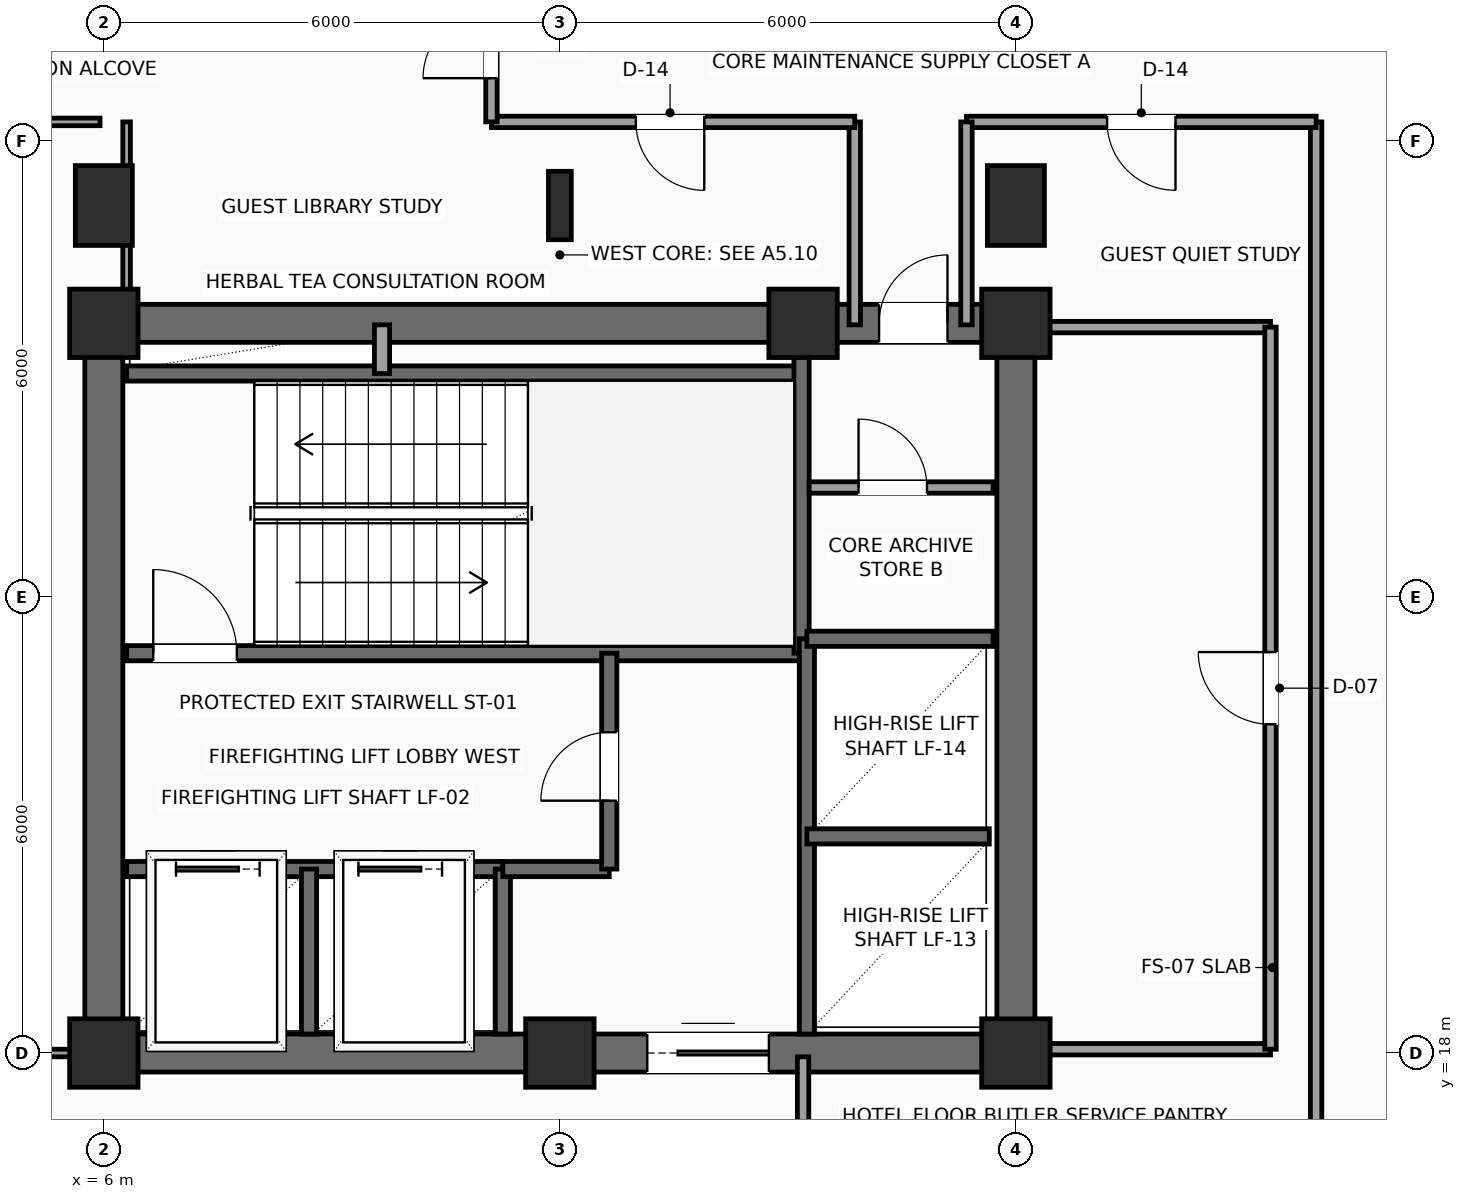
"""IFC4 building model, lengths in metres.
Left out: names, types, materials, properties, quantities, classifications, styles, units other than length and angle.
Written with IfcOpenShell. Run it as: python <this file> out.ifc"""

import sys

from ifc_helpers import new_model, si_unit, direction, frame, frame_2d, origin, origin_2d, place, context, subcontext, project, spatial, rectangle, i_section, extrude, element, fill, save


model = new_model("IFC4")
c1 = context("Model", 3, precision=1e-05, world=origin(), true_north=direction((0.0, 1.0)))
c2 = subcontext(c1, "Body", "Model", "MODEL_VIEW")
j1 = project(units=[si_unit("LENGTHUNIT", "METRE"), si_unit("PLANEANGLEUNIT", "RADIAN")], contexts=[c1])
p1 = place(None, origin())
s1 = spatial("IfcSite", under=j1, at=p1, CompositionType="ELEMENT")
p2 = place(p1, origin())
s2 = spatial("IfcBuilding", under=s1, at=p2, CompositionType="ELEMENT")
p3 = place(p2, frame((0.0, 0.0, 191.7)))
s3 = spatial("IfcBuildingStorey", under=s2, at=p3, CompositionType="ELEMENT", Elevation=191.7)
for number, where, z_axis, x_axis in (
    (1, (6.0, 18.0, 0.0), (0.0, 0.0, 1.0), (1.0, 0.0, 0.0)),
    (2, (12.0, 18.0, 0.0), (0.0, 0.0, 1.0), (1.0, 0.0, 0.0)),
    (3, (18.0, 18.0, 0.0), (0.0, 0.0, 1.0), (1.0, 0.0, 0.0)),
    (4, (6.0, 27.6, 0.0), (0.0, 0.0, 1.0), (1.0, 0.0, 0.0)),
    (5, (15.2, 27.6, 0.0), (0.0, 0.0, 1.0), (1.0, 0.0, 0.0)),
    (6, (18.0, 27.6, 0.0), (0.0, 0.0, 1.0), (1.0, 0.0, 0.0)),
):
    element("IfcColumn", number, at=place(p3, frame(where, z_axis=z_axis, x_axis=x_axis)), inside=s3, PredefinedType="COLUMN", context=c2, shape_type="SweptSolid", body=[
        extrude(rectangle(XDim=0.9, YDim=0.9, at=origin_2d()), origin(), (0.0, 0.0, 1.0), 3.75),
    ])
p4 = place(p3, frame((6.0, 29.15, 0.0), z_axis=(0.0, 0.0, 1.0), x_axis=(1.0, 0.0, 0.0)))
e7 = element("IfcColumn", 7, at=p4, inside=s3, PredefinedType="COLUMN", context=c2, shape_type="SweptSolid", body=[
    extrude(rectangle(XDim=0.75, YDim=1.05, at=origin_2d()), origin(), (0.0, 0.0, 1.0), 3.75),
])
p5 = place(p3, frame((12.0, 29.15, 0.0), z_axis=(0.0, 0.0, 1.0), x_axis=(1.0, 0.0, 0.0)))
e8 = element("IfcColumn", 8, at=p5, inside=s3, PredefinedType="COLUMN", context=c2, shape_type="SweptSolid", body=[
    extrude(i_section(OverallWidth=0.3, OverallDepth=0.9, WebThickness=0.019, FlangeThickness=0.035, FilletRadius=0.03, at=origin_2d()), origin(), (0.0, 0.0, 1.0), 3.75),
])
p6 = place(p3, frame((18.0, 29.15, 0.0), z_axis=(0.0, 0.0, 1.0), x_axis=(1.0, 0.0, 0.0)))
e9 = element("IfcColumn", 9, at=p6, inside=s3, PredefinedType="COLUMN", context=c2, shape_type="SweptSolid", body=[
    extrude(rectangle(XDim=0.75, YDim=1.05, at=origin_2d()), origin(), (0.0, 0.0, 1.0), 3.75),
])
p7 = place(p3, frame((6.0, 18.0, 0.0), z_axis=(0.0, 0.0, 1.0), x_axis=(1.0, 0.0, 0.0)))
e10 = element("IfcWall", 10, at=p7, inside=s3, PredefinedType="SHEAR", context=c2, shape_type="SweptSolid", body=[
    extrude(rectangle(XDim=12.0, YDim=0.5, at=frame_2d((6.0, 0.0))), origin(), (0.0, 0.0, 1.0), 3.54),
])
p8 = place(p7, frame((7.15, 0.0, 0.0)))
e11 = element("IfcOpeningElement", 11, at=p8, cuts=e10, PredefinedType="OPENING", context=c2, shape_type="SweptSolid", body=[
    extrude(rectangle(XDim=1.6, YDim=2.3, at=frame_2d((0.8, 1.15))), frame((0.0, 0.26, 0.0), z_axis=(0.0, -1.0, 0.0), x_axis=(1.0, 0.0, 0.0)), (0.0, 0.0, 1.0), 0.52),
])
p9 = place(p3, frame((6.0, 27.6, 0.0), z_axis=(0.0, 0.0, 1.0), x_axis=(1.0, 0.0, 0.0)))
e12 = element("IfcWall", 12, at=p9, inside=s3, PredefinedType="SHEAR", context=c2, shape_type="SweptSolid", body=[
    extrude(rectangle(XDim=12.0, YDim=0.5, at=frame_2d((6.0, 0.0))), origin(), (0.0, 0.0, 1.0), 3.54),
])
p10 = place(p9, frame((10.2, 0.0, 0.0)))
e13 = element("IfcOpeningElement", 13, at=p10, cuts=e12, PredefinedType="OPENING", context=c2, shape_type="SweptSolid", body=[
    extrude(rectangle(XDim=0.9, YDim=2.15, at=frame_2d((0.45, 1.075))), frame((0.0, 0.26, 0.0), z_axis=(0.0, -1.0, 0.0), x_axis=(1.0, 0.0, 0.0)), (0.0, 0.0, 1.0), 0.52),
])
for number, where, z_axis, x_axis in (
    (14, (6.0, 18.0, 0.0), (0.0, 0.0, 1.0), (0.0, 1.0, 0.0)),
    (15, (18.0, 18.0, 0.0), (0.0, 0.0, 1.0), (0.0, 1.0, 0.0)),
):
    element("IfcWall", number, at=place(p3, frame(where, z_axis=z_axis, x_axis=x_axis)), inside=s3, PredefinedType="SHEAR", context=c2, shape_type="SweptSolid", body=[
        extrude(rectangle(XDim=9.6, YDim=0.5, at=frame_2d((4.8, 0.0))), origin(), (0.0, 0.0, 1.0), 3.54),
    ])
p11 = place(p3, frame((6.3, 23.26, 0.0), z_axis=(0.0, 0.0, 1.0), x_axis=(1.0, 0.0, 0.0)))
e16 = element("IfcWall", 16, at=p11, inside=s3, PredefinedType="SHEAR", context=c2, shape_type="SweptSolid", body=[
    extrude(rectangle(XDim=8.88, YDim=0.2, at=frame_2d((4.44, 0.0))), origin(), (0.0, 0.0, 1.0), 3.54),
])
p12 = place(p11, frame((0.35, 0.0, 0.0)))
e17 = element("IfcOpeningElement", 17, at=p12, cuts=e16, PredefinedType="OPENING", context=c2, shape_type="SweptSolid", body=[
    extrude(rectangle(XDim=1.1, YDim=2.2, at=frame_2d((0.55, 1.1))), frame((0.0, 0.11, 0.0), z_axis=(0.0, -1.0, 0.0), x_axis=(1.0, 0.0, 0.0)), (0.0, 0.0, 1.0), 0.22),
])
p13 = place(p3, frame((6.3, 26.94, 0.0), z_axis=(0.0, 0.0, 1.0), x_axis=(1.0, 0.0, 0.0)))
e18 = element("IfcWall", 18, at=p13, inside=s3, PredefinedType="SHEAR", context=c2, shape_type="SweptSolid", body=[
    extrude(rectangle(XDim=8.88, YDim=0.2, at=frame_2d((4.44, 0.0))), origin(), (0.0, 0.0, 1.0), 3.54),
])
p14 = place(p3, frame((15.18, 23.26, 0.0), z_axis=(0.0, 0.0, 1.0), x_axis=(0.0, 1.0, 0.0)))
e19 = element("IfcWall", 19, at=p14, inside=s3, PredefinedType="SHEAR", context=c2, shape_type="SweptSolid", body=[
    extrude(rectangle(XDim=4.04, YDim=0.2, at=frame_2d((2.02, 0.0))), origin(), (0.0, 0.0, 1.0), 3.54),
])
p15 = place(p3, frame((6.3, 20.42, 0.0), z_axis=(0.0, 0.0, 1.0), x_axis=(1.0, 0.0, 0.0)))
e20 = element("IfcWall", 20, at=p15, inside=s3, PredefinedType="SHEAR", context=c2, shape_type="SweptSolid", body=[
    extrude(rectangle(XDim=4.95, YDim=0.2, at=frame_2d((2.475, 0.0))), origin(), (0.0, 0.0, 1.0), 3.54),
])
p16 = place(p15, frame((0.65, 0.0, 0.0)))
e21 = element("IfcOpeningElement", 21, at=p16, cuts=e20, PredefinedType="OPENING", context=c2, shape_type="SweptSolid", body=[
    extrude(rectangle(XDim=1.1, YDim=2.2, at=frame_2d((0.55, 1.1))), frame((0.0, 0.11, 0.0), z_axis=(0.0, -1.0, 0.0), x_axis=(1.0, 0.0, 0.0)), (0.0, 0.0, 1.0), 0.22),
])
p17 = place(p15, frame((3.05, 0.0, 0.0)))
e22 = element("IfcOpeningElement", 22, at=p17, cuts=e20, PredefinedType="OPENING", context=c2, shape_type="SweptSolid", body=[
    extrude(rectangle(XDim=1.1, YDim=2.2, at=frame_2d((0.55, 1.1))), frame((0.0, 0.11, 0.0), z_axis=(0.0, -1.0, 0.0), x_axis=(1.0, 0.0, 0.0)), (0.0, 0.0, 1.0), 0.22),
])
for number, where, z_axis, x_axis in (
    (23, (8.7, 18.25, 0.0), (0.0, 0.0, 1.0), (0.0, 1.0, 0.0)),
    (24, (11.25, 18.25, 0.0), (0.0, 0.0, 1.0), (0.0, 1.0, 0.0)),
):
    element("IfcWall", number, at=place(p3, frame(where, z_axis=z_axis, x_axis=x_axis)), inside=s3, PredefinedType="SHEAR", context=c2, shape_type="SweptSolid", body=[
        extrude(rectangle(XDim=2.17, YDim=0.2, at=frame_2d((1.085, 0.0))), origin(), (0.0, 0.0, 1.0), 3.54),
    ])
p18 = place(p3, frame((11.25, 20.42, 0.0), z_axis=(0.0, 0.0, 1.0), x_axis=(1.0, 0.0, 0.0)))
e25 = element("IfcWall", 25, at=p18, inside=s3, PredefinedType="SHEAR", context=c2, shape_type="SweptSolid", body=[
    extrude(rectangle(XDim=1.4, YDim=0.2, at=frame_2d((0.7, 0.0))), origin(), (0.0, 0.0, 1.0), 3.54),
])
p19 = place(p3, frame((12.65, 20.42, 0.0), z_axis=(0.0, 0.0, 1.0), x_axis=(0.0, 1.0, 0.0)))
e26 = element("IfcWall", 26, at=p19, inside=s3, PredefinedType="SHEAR", context=c2, shape_type="SweptSolid", body=[
    extrude(rectangle(XDim=2.84, YDim=0.2, at=frame_2d((1.42, 0.0))), origin(), (0.0, 0.0, 1.0), 3.54),
])
p20 = place(p19, frame((0.9, 0.0, 0.0)))
e27 = element("IfcOpeningElement", 27, at=p20, cuts=e26, PredefinedType="OPENING", context=c2, shape_type="SweptSolid", body=[
    extrude(rectangle(XDim=0.9, YDim=2.15, at=frame_2d((0.45, 1.075))), frame((0.0, 0.11, 0.0), z_axis=(0.0, -1.0, 0.0), x_axis=(1.0, 0.0, 0.0)), (0.0, 0.0, 1.0), 0.22),
])
p21 = place(p3, frame((9.66, 26.94, 0.0), z_axis=(0.0, 0.0, 1.0), x_axis=(0.0, 1.0, 0.0)))
e28 = element("IfcWall", 28, at=p21, inside=s3, PredefinedType="SOLIDWALL", context=c2, shape_type="SweptSolid", body=[
    extrude(rectangle(XDim=0.64, YDim=0.2, at=frame_2d((0.32, 0.0))), origin(), (0.0, 0.0, 1.0), 3.54),
])
p22 = place(p3, frame((15.25, 18.25, 0.0), z_axis=(0.0, 0.0, 1.0), x_axis=(0.0, 1.0, 0.0)))
e29 = element("IfcWall", 29, at=p22, inside=s3, PredefinedType="SHEAR", context=c2, shape_type="SweptSolid", body=[
    extrude(rectangle(XDim=5.2, YDim=0.2, at=frame_2d((2.6, 0.0))), origin(), (0.0, 0.0, 1.0), 3.54),
])
p23 = place(p3, frame((15.25, 20.85, 0.0), z_axis=(0.0, 0.0, 1.0), x_axis=(1.0, 0.0, 0.0)))
e30 = element("IfcWall", 30, at=p23, inside=s3, PredefinedType="SHEAR", context=c2, shape_type="SweptSolid", body=[
    extrude(rectangle(XDim=2.4, YDim=0.2, at=frame_2d((1.2, 0.0))), origin(), (0.0, 0.0, 1.0), 3.54),
])
p24 = place(p3, frame((15.25, 23.45, 0.0), z_axis=(0.0, 0.0, 1.0), x_axis=(1.0, 0.0, 0.0)))
e31 = element("IfcWall", 31, at=p24, inside=s3, PredefinedType="SHEAR", context=c2, shape_type="SweptSolid", body=[
    extrude(rectangle(XDim=2.45, YDim=0.2, at=frame_2d((1.225, 0.0))), origin(), (0.0, 0.0, 1.0), 3.54),
])
p25 = place(p3, frame((15.28, 25.44, 0.0), z_axis=(0.0, 0.0, 1.0), x_axis=(1.0, 0.0, 0.0)))
e32 = element("IfcWall", 32, at=p25, inside=s3, PredefinedType="PARTITIONING", context=c2, shape_type="SweptSolid", body=[
    extrude(rectangle(XDim=2.42, YDim=0.15, at=frame_2d((1.21, 0.0))), origin(), (0.0, 0.0, 1.0), 3.54),
])
p26 = place(p25, frame((0.65, 0.0, 0.0)))
e33 = element("IfcOpeningElement", 33, at=p26, cuts=e32, PredefinedType="OPENING", context=c2, shape_type="SweptSolid", body=[
    extrude(rectangle(XDim=0.9, YDim=2.15, at=frame_2d((0.45, 1.075))), frame((0.0, 0.085, 0.0), z_axis=(0.0, -1.0, 0.0), x_axis=(1.0, 0.0, 0.0)), (0.0, 0.0, 1.0), 0.17),
])
p27 = place(p3, frame((15.2, 17.95, 0.0), z_axis=(0.0, 0.0, 1.0), x_axis=(0.0, -1.0, 0.0)))
e34 = element("IfcWall", 34, at=p27, inside=s3, PredefinedType="PARTITIONING", context=c2, shape_type="SweptSolid", body=[
    extrude(rectangle(XDim=1.7, YDim=0.15, at=frame_2d((0.85, 0.0))), origin(), (0.0, 0.0, 1.0), 3.54),
])
p28 = place(p3, frame((21.95, 11.25, 0.0), z_axis=(0.0, 0.0, 1.0), x_axis=(0.0, 1.0, 0.0)))
e35 = element("IfcWall", 35, at=p28, inside=s3, PredefinedType="PARTITIONING", context=c2, shape_type="SweptSolid", body=[
    extrude(rectangle(XDim=19.0, YDim=0.15, at=frame_2d((9.5, 0.0))), origin(), (0.0, 0.0, 1.0), 3.54),
])
p29 = place(p3, frame((21.95, 30.25, 0.0), z_axis=(0.0, 0.0, 1.0), x_axis=(-1.0, 0.0, 0.0)))
e36 = element("IfcWall", 36, at=p29, inside=s3, PredefinedType="PARTITIONING", context=c2, shape_type="SweptSolid", body=[
    extrude(rectangle(XDim=4.6, YDim=0.15, at=frame_2d((2.3, 0.0))), origin(), (0.0, 0.0, 1.0), 3.54),
])
p30 = place(p29, frame((1.85, 0.0, 0.0)))
e37 = element("IfcOpeningElement", 37, at=p30, cuts=e36, PredefinedType="OPENING", context=c2, shape_type="SweptSolid", body=[
    extrude(rectangle(XDim=0.9, YDim=2.1, at=frame_2d((0.45, 1.05))), frame((0.0, 0.085, 0.0), z_axis=(0.0, -1.0, 0.0), x_axis=(1.0, 0.0, 0.0)), (0.0, 0.0, 1.0), 0.17),
])
for number, where, z_axis, x_axis in (
    (38, (17.35, 30.25, 0.0), (0.0, 0.0, 1.0), (0.0, -1.0, 0.0)),
    (39, (15.88, 27.58, 0.0), (0.0, 0.0, 1.0), (0.0, 1.0, 0.0)),
):
    element("IfcWall", number, at=place(p3, frame(where, z_axis=z_axis, x_axis=x_axis)), inside=s3, PredefinedType="PARTITIONING", context=c2, shape_type="SweptSolid", body=[
        extrude(rectangle(XDim=2.67, YDim=0.15, at=frame_2d((1.335, 0.0))), origin(), (0.0, 0.0, 1.0), 3.54),
    ])
p31 = place(p3, frame((15.88, 30.25, 0.0), z_axis=(0.0, 0.0, 1.0), x_axis=(-1.0, 0.0, 0.0)))
e40 = element("IfcWall", 40, at=p31, inside=s3, PredefinedType="PARTITIONING", context=c2, shape_type="SweptSolid", body=[
    extrude(rectangle(XDim=4.78, YDim=0.15, at=frame_2d((2.39, 0.0))), origin(), (0.0, 0.0, 1.0), 3.54),
])
p32 = place(p31, frame((1.98, 0.0, 0.0)))
e41 = element("IfcOpeningElement", 41, at=p32, cuts=e40, PredefinedType="OPENING", context=c2, shape_type="SweptSolid", body=[
    extrude(rectangle(XDim=0.9, YDim=2.1, at=frame_2d((0.45, 1.05))), frame((0.0, 0.085, 0.0), z_axis=(0.0, -1.0, 0.0), x_axis=(1.0, 0.0, 0.0)), (0.0, 0.0, 1.0), 0.17),
])
p33 = place(p3, frame((11.1, 30.25, 0.0), z_axis=(0.0, 0.0, 1.0), x_axis=(0.0, 1.0, 0.0)))
e42 = element("IfcWall", 42, at=p33, inside=s3, PredefinedType="PARTITIONING", context=c2, shape_type="SweptSolid", body=[
    extrude(rectangle(XDim=2.05, YDim=0.15, at=frame_2d((1.025, 0.0))), origin(), (0.0, 0.0, 1.0), 3.54),
])
p34 = place(p33, frame((0.575, 0.0, 0.0)))
e43 = element("IfcOpeningElement", 43, at=p34, cuts=e42, PredefinedType="OPENING", context=c2, shape_type="SweptSolid", body=[
    extrude(rectangle(XDim=0.9, YDim=2.1, at=frame_2d((0.45, 1.05))), frame((0.0, 0.085, 0.0), z_axis=(0.0, -1.0, 0.0), x_axis=(1.0, 0.0, 0.0)), (0.0, 0.0, 1.0), 0.17),
])
p35 = place(p3, frame((18.1, 18.05, 0.0), z_axis=(0.0, 0.0, 1.0), x_axis=(1.0, 0.0, 0.0)))
e44 = element("IfcWall", 44, at=p35, inside=s3, PredefinedType="PARTITIONING", context=c2, shape_type="SweptSolid", body=[
    extrude(rectangle(XDim=3.25, YDim=0.15, at=frame_2d((1.625, 0.0))), origin(), (0.0, 0.0, 1.0), 3.132),
])
p36 = place(p3, frame((18.1, 27.55, 0.0), z_axis=(0.0, 0.0, 1.0), x_axis=(1.0, 0.0, 0.0)))
e45 = element("IfcWall", 45, at=p36, inside=s3, PredefinedType="PARTITIONING", context=c2, shape_type="SweptSolid", body=[
    extrude(rectangle(XDim=3.25, YDim=0.15, at=frame_2d((1.625, 0.0))), origin(), (0.0, 0.0, 1.0), 3.54),
])
p37 = place(p3, frame((21.35, 18.05, 0.0), z_axis=(0.0, 0.0, 1.0), x_axis=(0.0, 1.0, 0.0)))
e46 = element("IfcWall", 46, at=p37, inside=s3, PredefinedType="PARTITIONING", context=c2, shape_type="SweptSolid", body=[
    extrude(rectangle(XDim=9.5, YDim=0.15, at=frame_2d((4.75, 0.0))), origin(), (0.0, 0.0, 1.0), 3.54),
])
p38 = place(p37, frame((4.275, 0.0, 0.0)))
e47 = element("IfcOpeningElement", 47, at=p38, cuts=e46, PredefinedType="OPENING", context=c2, shape_type="SweptSolid", body=[
    extrude(rectangle(XDim=0.95, YDim=2.15, at=frame_2d((0.475, 1.075))), frame((0.0, 0.085, 0.0), z_axis=(0.0, -1.0, 0.0), x_axis=(1.0, 0.0, 0.0)), (0.0, 0.0, 1.0), 0.17),
])
p39 = place(p3, frame((3.65, 18.0, 0.0), z_axis=(0.0, 0.0, 1.0), x_axis=(1.0, 0.0, 0.0)))
e48 = element("IfcWall", 48, at=p39, inside=s3, PredefinedType="PARTITIONING", context=c2, shape_type="SweptSolid", body=[
    extrude(rectangle(XDim=2.3, YDim=0.1, at=frame_2d((1.15, 0.0))), origin(), (0.0, 0.0, 1.0), 3.132),
])
p40 = place(p39, frame((0.7, 0.0, 0.0)))
e49 = element("IfcOpeningElement", 49, at=p40, cuts=e48, PredefinedType="OPENING", context=c2, shape_type="SweptSolid", body=[
    extrude(rectangle(XDim=0.9, YDim=2.1, at=frame_2d((0.45, 1.05))), frame((0.0, 0.06, 0.0), z_axis=(0.0, -1.0, 0.0), x_axis=(1.0, 0.0, 0.0)), (0.0, 0.0, 1.0), 0.12),
])
p41 = place(p3, frame((3.65, 30.25, 0.0), z_axis=(0.0, 0.0, 1.0), x_axis=(1.0, 0.0, 0.0)))
e50 = element("IfcWall", 50, at=p41, inside=s3, PredefinedType="PARTITIONING", context=c2, shape_type="SweptSolid", body=[
    extrude(rectangle(XDim=2.3, YDim=0.1, at=frame_2d((1.15, 0.0))), origin(), (0.0, 0.0, 1.0), 3.54),
])
p42 = place(p3, frame((6.3, 27.65, 0.0), z_axis=(0.0, 0.0, 1.0), x_axis=(0.0, 1.0, 0.0)))
e51 = element("IfcWall", 51, at=p42, inside=s3, PredefinedType="PARTITIONING", context=c2, shape_type="SweptSolid", body=[
    extrude(rectangle(XDim=2.6, YDim=0.1, at=frame_2d((1.3, 0.0))), origin(), (0.0, 0.0, 1.0), 3.54),
])
p43 = place(p8, origin())
e52 = element("IfcDoor", 52, at=p43, inside=s3, OperationType="DOUBLE_DOOR_SLIDING", PredefinedType="DOOR", context=c2, shape_type="SweptSolid", body=[
    extrude(rectangle(XDim=1.6, YDim=2.3, at=frame_2d((0.8, 1.15))), frame((0.0, 0.025, 0.0), z_axis=(0.0, -1.0, 0.0), x_axis=(1.0, 0.0, 0.0)), (0.0, 0.0, 1.0), 0.05),
])
fill(e11, e52)
p44 = place(p10, origin())
e53 = element("IfcDoor", 53, at=p44, inside=s3, OperationType="SINGLE_SWING_RIGHT", PredefinedType="DOOR", context=c2, shape_type="SweptSolid", body=[
    extrude(rectangle(XDim=0.9, YDim=2.15, at=frame_2d((0.45, 1.075))), frame((0.0, 0.025, 0.0), z_axis=(0.0, -1.0, 0.0), x_axis=(1.0, 0.0, 0.0)), (0.0, 0.0, 1.0), 0.05),
])
fill(e13, e53)
p45 = place(p12, origin())
e54 = element("IfcDoor", 54, at=p45, inside=s3, OperationType="SINGLE_SWING_LEFT", PredefinedType="DOOR", context=c2, shape_type="SweptSolid", body=[
    extrude(rectangle(XDim=1.1, YDim=2.2, at=frame_2d((0.55, 1.1))), frame((0.0, 0.025, 0.0), z_axis=(0.0, -1.0, 0.0), x_axis=(1.0, 0.0, 0.0)), (0.0, 0.0, 1.0), 0.05),
])
fill(e17, e54)
p46 = place(p16, origin())
e55 = element("IfcDoor", 55, at=p46, inside=s3, OperationType="SLIDING_TO_LEFT", PredefinedType="DOOR", context=c2, shape_type="SweptSolid", body=[
    extrude(rectangle(XDim=1.1, YDim=2.2, at=frame_2d((0.55, 1.1))), frame((0.0, 0.025, 0.0), z_axis=(0.0, -1.0, 0.0), x_axis=(1.0, 0.0, 0.0)), (0.0, 0.0, 1.0), 0.05),
])
fill(e21, e55)
p47 = place(p17, origin())
e56 = element("IfcDoor", 56, at=p47, inside=s3, OperationType="SLIDING_TO_LEFT", PredefinedType="DOOR", context=c2, shape_type="SweptSolid", body=[
    extrude(rectangle(XDim=1.1, YDim=2.2, at=frame_2d((0.55, 1.1))), frame((0.0, 0.025, 0.0), z_axis=(0.0, -1.0, 0.0), x_axis=(1.0, 0.0, 0.0)), (0.0, 0.0, 1.0), 0.05),
])
fill(e22, e56)
p48 = place(p20, origin())
e57 = element("IfcDoor", 57, at=p48, inside=s3, OperationType="SINGLE_SWING_LEFT", PredefinedType="DOOR", context=c2, shape_type="SweptSolid", body=[
    extrude(rectangle(XDim=0.9, YDim=2.15, at=frame_2d((0.45, 1.075))), frame((0.0, 0.025, 0.0), z_axis=(0.0, -1.0, 0.0), x_axis=(1.0, 0.0, 0.0)), (0.0, 0.0, 1.0), 0.05),
])
fill(e27, e57)
p49 = place(p26, origin())
e58 = element("IfcDoor", 58, at=p49, inside=s3, OperationType="SINGLE_SWING_LEFT", PredefinedType="DOOR", context=c2, shape_type="SweptSolid", body=[
    extrude(rectangle(XDim=0.9, YDim=2.15, at=frame_2d((0.45, 1.075))), frame((0.0, 0.025, 0.0), z_axis=(0.0, -1.0, 0.0), x_axis=(1.0, 0.0, 0.0)), (0.0, 0.0, 1.0), 0.05),
])
fill(e33, e58)
p50 = place(p30, origin())
e59 = element("IfcDoor", 59, at=p50, inside=s3, OperationType="SINGLE_SWING_LEFT", PredefinedType="DOOR", context=c2, shape_type="SweptSolid", body=[
    extrude(rectangle(XDim=0.9, YDim=2.1, at=frame_2d((0.45, 1.05))), frame((0.0, 0.025, 0.0), z_axis=(0.0, -1.0, 0.0), x_axis=(1.0, 0.0, 0.0)), (0.0, 0.0, 1.0), 0.05),
])
fill(e37, e59)
p51 = place(p32, origin())
e60 = element("IfcDoor", 60, at=p51, inside=s3, OperationType="SINGLE_SWING_LEFT", PredefinedType="DOOR", context=c2, shape_type="SweptSolid", body=[
    extrude(rectangle(XDim=0.9, YDim=2.1, at=frame_2d((0.45, 1.05))), frame((0.0, 0.025, 0.0), z_axis=(0.0, -1.0, 0.0), x_axis=(1.0, 0.0, 0.0)), (0.0, 0.0, 1.0), 0.05),
])
fill(e41, e60)
p52 = place(p34, origin())
e61 = element("IfcDoor", 61, at=p52, inside=s3, OperationType="SINGLE_SWING_LEFT", PredefinedType="DOOR", context=c2, shape_type="SweptSolid", body=[
    extrude(rectangle(XDim=0.9, YDim=2.1, at=frame_2d((0.45, 1.05))), frame((0.0, 0.025, 0.0), z_axis=(0.0, -1.0, 0.0), x_axis=(1.0, 0.0, 0.0)), (0.0, 0.0, 1.0), 0.05),
])
fill(e43, e61)
p53 = place(p38, origin())
e62 = element("IfcDoor", 62, at=p53, inside=s3, OperationType="SINGLE_SWING_RIGHT", PredefinedType="DOOR", context=c2, shape_type="SweptSolid", body=[
    extrude(rectangle(XDim=0.95, YDim=2.15, at=frame_2d((0.475, 1.075))), frame((0.0, 0.025, 0.0), z_axis=(0.0, -1.0, 0.0), x_axis=(1.0, 0.0, 0.0)), (0.0, 0.0, 1.0), 0.05),
])
fill(e47, e62)
save(model, sys.argv[1])
